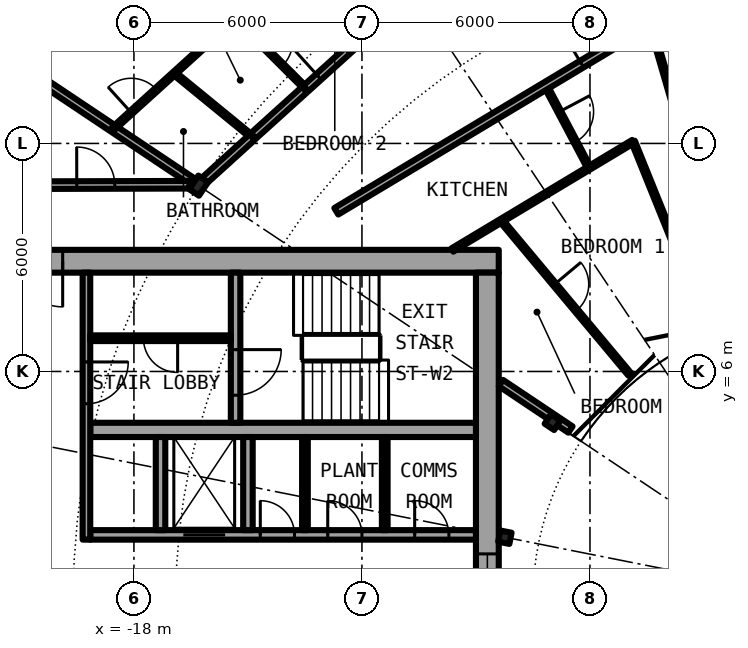
"""IFC4 building model, lengths in metres.
Left out: names, types, materials, properties, quantities, classifications, styles, units other than length and angle.
Written with IfcOpenShell. Run it as: python <this file> out.ifc"""

import sys

from ifc_helpers import new_model, si_unit, direction, frame, frame_2d, origin, origin_2d, place, context, subcontext, project, spatial, rectangle, i_section, extrude, element, fill, save


model = new_model("IFC4")
c1 = context("Model", 3, precision=1e-05, world=origin(), true_north=direction((0.0, 1.0)))
c2 = subcontext(c1, "Body", "Model", "MODEL_VIEW")
j1 = project(units=[si_unit("LENGTHUNIT", "METRE"), si_unit("PLANEANGLEUNIT", "RADIAN")], contexts=[c1])
p1 = place(None, origin())
s1 = spatial("IfcSite", under=j1, at=p1, CompositionType="ELEMENT")
p2 = place(p1, origin())
s2 = spatial("IfcBuilding", under=s1, at=p2, CompositionType="ELEMENT")
p3 = place(p2, frame((0.0, 0.0, 129.95)))
s3 = spatial("IfcBuildingStorey", under=s2, at=p3, CompositionType="ELEMENT", Elevation=129.95)
p4 = place(p3, frame((-16.297, 10.889, 0.0), z_axis=(0.0, 0.0, 1.0), x_axis=(-0.831469612303, 0.55557023302, 0.0)))
e1 = element("IfcColumn", 1, at=p4, inside=s3, PredefinedType="COLUMN", context=c2, shape_type="SweptSolid", body=[
    extrude(i_section(OverallWidth=0.307, OverallDepth=0.432, WebThickness=0.021, FlangeThickness=0.04, FilletRadius=0.027, at=origin_2d()), origin(), (0.0, 0.0, 1.0), 3.05),
])
for number, where, z_axis, x_axis in (
    (2, (-6.984, 4.667, 0.0), (0.0, 0.0, 1.0), (-0.831, 0.556, 0.0)),
    (3, (-8.239, 1.639, 0.0), (0.0, 0.0, 1.0), (-0.981, 0.195, 0.0)),
):
    element("IfcColumn", number, at=place(p3, frame(where, z_axis=z_axis, x_axis=x_axis)), inside=s3, PredefinedType="COLUMN", context=c2, shape_type="SweptSolid", body=[
        extrude(i_section(OverallWidth=0.3, OverallDepth=0.3, WebThickness=0.011, FlangeThickness=0.019, FilletRadius=0.027, at=origin_2d()), origin(), (0.0, 0.0, 1.0), 3.05),
    ])
p5 = place(p3, frame((-8.4, 8.9, 0.0), z_axis=(0.0, 0.0, 1.0), x_axis=(-1.0, 0.0, 0.0)))
e4 = element("IfcWall", 4, at=p5, inside=s3, PredefinedType="SHEAR", context=c2, shape_type="SweptSolid", body=[
    extrude(rectangle(XDim=13.8, YDim=0.6, at=frame_2d((6.9, 0.0))), origin(), (0.0, 0.0, 1.0), 3.05),
])
p6 = place(p5, frame((11.475, 0.0, 0.0)))
e5 = element("IfcOpeningElement", 5, at=p6, cuts=e4, PredefinedType="OPENING", context=c2, shape_type="SweptSolid", body=[
    extrude(rectangle(XDim=1.2, YDim=2.3, at=frame_2d((0.6, 1.15))), frame((0.0, 0.31, 0.0), z_axis=(0.0, -1.0, 0.0), x_axis=(1.0, 0.0, 0.0)), (0.0, 0.0, 1.0), 0.62),
])
p7 = place(p3, frame((-8.7, 8.6, 0.0), z_axis=(0.0, 0.0, 1.0), x_axis=(0.0, -1.0, 0.0)))
e6 = element("IfcWall", 6, at=p7, inside=s3, PredefinedType="SHEAR", context=c2, shape_type="SweptSolid", body=[
    extrude(rectangle(XDim=17.2, YDim=0.6, at=frame_2d((8.6, 0.0))), origin(), (0.0, 0.0, 1.0), 3.05),
])
p8 = place(p7, frame((7.4, 0.0, 0.1)))
e7 = element("IfcOpeningElement", 7, at=p8, cuts=e6, PredefinedType="OPENING", context=c2, shape_type="SweptSolid", body=[
    extrude(rectangle(XDim=2.4, YDim=2.2, at=frame_2d((1.2, 1.1))), frame((0.0, 0.31, 0.0), z_axis=(0.0, -1.0, 0.0), x_axis=(1.0, 0.0, 0.0)), (0.0, 0.0, 1.0), 0.62),
])
p9 = place(p3, frame((-19.15, 1.7, 0.0), z_axis=(0.0, 0.0, 1.0), x_axis=(1.0, 0.0, 0.0)))
e8 = element("IfcWall", 8, at=p9, inside=s3, PredefinedType="SHEAR", context=c2, shape_type="SweptSolid", body=[
    extrude(rectangle(XDim=10.15, YDim=0.25, at=frame_2d((5.075, 0.0))), origin(), (0.0, 0.0, 1.0), 3.05),
])
p10 = place(p9, frame((2.45, 0.0, 0.0)))
e9 = element("IfcOpeningElement", 9, at=p10, cuts=e8, PredefinedType="OPENING", context=c2, shape_type="SweptSolid", body=[
    extrude(rectangle(XDim=1.1, YDim=2.3, at=frame_2d((0.55, 1.15))), frame((0.0, 0.135, 0.0), z_axis=(0.0, -1.0, 0.0), x_axis=(1.0, 0.0, 0.0)), (0.0, 0.0, 1.0), 0.27),
])
p11 = place(p9, frame((8.538, 0.0, 0.0)))
e10 = element("IfcOpeningElement", 10, at=p11, cuts=e8, PredefinedType="OPENING", context=c2, shape_type="SweptSolid", body=[
    extrude(rectangle(XDim=0.9, YDim=2.3, at=frame_2d((0.45, 1.15))), frame((0.0, 0.135, 0.0), z_axis=(0.0, -1.0, 0.0), x_axis=(1.0, 0.0, 0.0)), (0.0, 0.0, 1.0), 0.27),
])
p12 = place(p9, frame((6.25, 0.0, 0.0)))
e11 = element("IfcOpeningElement", 11, at=p12, cuts=e8, PredefinedType="OPENING", context=c2, shape_type="SweptSolid", body=[
    extrude(rectangle(XDim=0.9, YDim=2.3, at=frame_2d((0.45, 1.15))), frame((0.0, 0.135, 0.0), z_axis=(0.0, -1.0, 0.0), x_axis=(1.0, 0.0, 0.0)), (0.0, 0.0, 1.0), 0.27),
])
p13 = place(p9, frame((4.475, 0.0, 0.0)))
e12 = element("IfcOpeningElement", 12, at=p13, cuts=e8, PredefinedType="OPENING", context=c2, shape_type="SweptSolid", body=[
    extrude(rectangle(XDim=0.9, YDim=2.3, at=frame_2d((0.45, 1.15))), frame((0.0, 0.135, 0.0), z_axis=(0.0, -1.0, 0.0), x_axis=(1.0, 0.0, 0.0)), (0.0, 0.0, 1.0), 0.27),
])
p14 = place(p3, frame((-9.0, 4.462, 0.0), z_axis=(0.0, 0.0, 1.0), x_axis=(-1.0, 0.0, 0.0)))
e13 = element("IfcWall", 13, at=p14, inside=s3, PredefinedType="SHEAR", context=c2, shape_type="SweptSolid", body=[
    extrude(rectangle(XDim=10.15, YDim=0.375, at=frame_2d((5.075, 0.0))), origin(), (0.0, 0.0, 1.0), 3.05),
])
p15 = place(p3, frame((-15.325, 8.6, 0.0), z_axis=(0.0, 0.0, 1.0), x_axis=(0.0, -1.0, 0.0)))
e14 = element("IfcWall", 14, at=p15, inside=s3, PredefinedType="SHEAR", context=c2, shape_type="SweptSolid", body=[
    extrude(rectangle(XDim=3.95, YDim=0.25, at=frame_2d((1.975, 0.0))), origin(), (0.0, 0.0, 1.0), 3.05),
])
p16 = place(p15, frame((2.025, 0.0, 0.0)))
e15 = element("IfcOpeningElement", 15, at=p16, cuts=e14, PredefinedType="OPENING", context=c2, shape_type="SweptSolid", body=[
    extrude(rectangle(XDim=1.2, YDim=2.3, at=frame_2d((0.6, 1.15))), frame((0.0, 0.135, 0.0), z_axis=(0.0, -1.0, 0.0), x_axis=(1.0, 0.0, 0.0)), (0.0, 0.0, 1.0), 0.27),
])
for number, where, z_axis, x_axis in (
    (16, (-15.0, 1.825, 0.0), (0.0, 0.0, 1.0), (0.0, 1.0, 0.0)),
    (17, (-17.3, 1.825, 0.0), (0.0, 0.0, 1.0), (0.0, 1.0, 0.0)),
):
    element("IfcWall", number, at=place(p3, frame(where, z_axis=z_axis, x_axis=x_axis)), inside=s3, PredefinedType="SOLIDWALL", context=c2, shape_type="SweptSolid", body=[
        extrude(rectangle(XDim=2.45, YDim=0.25, at=frame_2d((1.225, 0.0))), origin(), (0.0, 0.0, 1.0), 2.7),
    ])
p17 = place(p3, frame((-19.25, 8.6, 0.0), z_axis=(0.0, 0.0, 1.0), x_axis=(0.0, -1.0, 0.0)))
e18 = element("IfcWall", 18, at=p17, inside=s3, PredefinedType="SOLIDWALL", context=c2, shape_type="SweptSolid", body=[
    extrude(rectangle(XDim=7.025, YDim=0.2, at=frame_2d((3.513, 0.0))), origin(), (0.0, 0.0, 1.0), 2.7),
])
p18 = place(p17, frame((2.35, 0.0, 0.0)))
e19 = element("IfcOpeningElement", 19, at=p18, cuts=e18, PredefinedType="OPENING", context=c2, shape_type="SweptSolid", body=[
    extrude(rectangle(XDim=1.1, YDim=2.3, at=frame_2d((0.55, 1.15))), frame((0.0, 0.11, 0.0), z_axis=(0.0, -1.0, 0.0), x_axis=(1.0, 0.0, 0.0)), (0.0, 0.0, 1.0), 0.22),
])
for number, where, z_axis, x_axis in (
    (20, (-11.4, 1.825, 0.0), (0.0, 0.0, 1.0), (0.0, 1.0, 0.0)),
    (21, (-13.5, 1.825, 0.0), (0.0, 0.0, 1.0), (0.0, 1.0, 0.0)),
):
    element("IfcWall", number, at=place(p3, frame(where, z_axis=z_axis, x_axis=x_axis)), inside=s3, PredefinedType="PARTITIONING", context=c2, shape_type="SweptSolid", body=[
        extrude(rectangle(XDim=2.45, YDim=0.15, at=frame_2d((1.225, 0.0))), origin(), (0.0, 0.0, 1.0), 2.7),
    ])
p19 = place(p3, frame((-15.45, 6.875, 0.0), z_axis=(0.0, 0.0, 1.0), x_axis=(-1.0, 0.0, 0.0)))
e22 = element("IfcWall", 22, at=p19, inside=s3, PredefinedType="PARTITIONING", context=c2, shape_type="SweptSolid", body=[
    extrude(rectangle(XDim=3.7, YDim=0.15, at=frame_2d((1.85, 0.0))), origin(), (0.0, 0.0, 1.0), 2.7),
])
p20 = place(p19, frame((1.4, 0.0, 0.0)))
e23 = element("IfcOpeningElement", 23, at=p20, cuts=e22, PredefinedType="OPENING", context=c2, shape_type="SweptSolid", body=[
    extrude(rectangle(XDim=0.9, YDim=2.3, at=frame_2d((0.45, 1.15))), frame((0.0, 0.085, 0.0), z_axis=(0.0, -1.0, 0.0), x_axis=(1.0, 0.0, 0.0)), (0.0, 0.0, 1.0), 0.17),
])
p21 = place(p3, frame((-22.595, 15.098, 0.0), z_axis=(0.0, 0.0, 1.0), x_axis=(0.831406593008, -0.555664536482, 0.0)))
e24 = element("IfcWall", 24, at=p21, inside=s3, PredefinedType="PARTITIONING", context=c2, shape_type="SweptSolid", body=[
    extrude(rectangle(XDim=7.358, YDim=0.2, at=frame_2d((3.679, 0.0))), origin(), (0.0, 0.0, 1.0), 2.7),
])
p22 = place(p3, frame((-16.936, 13.845, 0.0), z_axis=(0.0, 0.0, 1.0), x_axis=(0.774162545943, -0.632986850147, 0.0)))
e25 = element("IfcWall", 25, at=p22, inside=s3, PredefinedType="PARTITIONING", context=c2, shape_type="SweptSolid", body=[
    extrude(rectangle(XDim=2.649, YDim=0.1, at=frame_2d((1.325, 0.0))), origin(), (0.0, 0.0, 1.0), 2.7),
])
p23 = place(p3, frame((-15.333, 15.297, 0.0), z_axis=(0.0, 0.0, 1.0), x_axis=(0.707851299421, -0.706361478217, 0.0)))
e26 = element("IfcWall", 26, at=p23, inside=s3, PredefinedType="PARTITIONING", context=c2, shape_type="SweptSolid", body=[
    extrude(rectangle(XDim=2.622, YDim=0.1, at=frame_2d((1.311, 0.0))), origin(), (0.0, 0.0, 1.0), 2.7),
])
p24 = place(p23, frame((0.861, 0.0, 0.0)))
e27 = element("IfcOpeningElement", 27, at=p24, cuts=e26, PredefinedType="OPENING", context=c2, shape_type="SweptSolid", body=[
    extrude(rectangle(XDim=0.9, YDim=2.3, at=frame_2d((0.45, 1.15))), frame((0.0, 0.06, 0.0), z_axis=(0.0, -1.0, 0.0), x_axis=(1.0, 0.0, 0.0)), (0.0, 0.0, 1.0), 0.12),
])
p25 = place(p3, frame((-8.335, 9.97, 0.0), z_axis=(0.0, 0.0, 1.0), x_axis=(0.641376424834, -0.767226356213, 0.0)))
e28 = element("IfcWall", 28, at=p25, inside=s3, PredefinedType="PARTITIONING", context=c2, shape_type="SweptSolid", body=[
    extrude(rectangle(XDim=5.275, YDim=0.1, at=frame_2d((2.637, 0.0))), origin(), (0.0, 0.0, 1.0), 2.7),
])
p26 = place(p25, frame((2.187, 0.0, 0.0)))
e29 = element("IfcOpeningElement", 29, at=p26, cuts=e28, PredefinedType="OPENING", context=c2, shape_type="SweptSolid", body=[
    extrude(rectangle(XDim=0.9, YDim=2.3, at=frame_2d((0.45, 1.15))), frame((0.0, 0.06, 0.0), z_axis=(0.0, -1.0, 0.0), x_axis=(1.0, 0.0, 0.0)), (0.0, 0.0, 1.0), 0.12),
])
p27 = place(p3, frame((-7.166, 13.517, 0.0), z_axis=(0.0, 0.0, 1.0), x_axis=(0.468337293896, -0.883549760425, 0.0)))
e30 = element("IfcWall", 30, at=p27, inside=s3, PredefinedType="PARTITIONING", context=c2, shape_type="SweptSolid", body=[
    extrude(rectangle(XDim=2.445, YDim=0.1, at=frame_2d((1.222, 0.0))), origin(), (0.0, 0.0, 1.0), 2.7),
])
p28 = place(p27, frame((0.772, 0.0, 0.0)))
e31 = element("IfcOpeningElement", 31, at=p28, cuts=e30, PredefinedType="OPENING", context=c2, shape_type="SweptSolid", body=[
    extrude(rectangle(XDim=0.9, YDim=2.3, at=frame_2d((0.45, 1.15))), frame((0.0, 0.06, 0.0), z_axis=(0.0, -1.0, 0.0), x_axis=(1.0, 0.0, 0.0)), (0.0, 0.0, 1.0), 0.12),
])
p29 = place(p3, frame((-4.864, 12.051, 0.0), z_axis=(0.0, 0.0, 1.0), x_axis=(0.374372761824, -0.927278294367, 0.0)))
e32 = element("IfcWall", 32, at=p29, inside=s3, PredefinedType="PARTITIONING", context=c2, shape_type="SweptSolid", body=[
    extrude(rectangle(XDim=5.276, YDim=0.1, at=frame_2d((2.638, 0.0))), origin(), (0.0, 0.0, 1.0), 2.7),
])
p30 = place(p29, frame((2.188, 0.0, 0.0)))
e33 = element("IfcOpeningElement", 33, at=p30, cuts=e32, PredefinedType="OPENING", context=c2, shape_type="SweptSolid", body=[
    extrude(rectangle(XDim=0.9, YDim=2.3, at=frame_2d((0.45, 1.15))), frame((0.0, 0.06, 0.0), z_axis=(0.0, -1.0, 0.0), x_axis=(1.0, 0.0, 0.0)), (0.0, 0.0, 1.0), 0.12),
])
p31 = place(p3, frame((-4.411, 15.168, 0.0), z_axis=(0.0, 0.0, 1.0), x_axis=(0.279201466266, -0.960232545395, 0.0)))
e34 = element("IfcWall", 34, at=p31, inside=s3, PredefinedType="PARTITIONING", context=c2, shape_type="SweptSolid", body=[
    extrude(rectangle(XDim=2.524, YDim=0.1, at=frame_2d((1.262, 0.0))), origin(), (0.0, 0.0, 1.0), 2.7),
])
p32 = place(p3, frame((-6.513, 4.472, 0.0), z_axis=(0.0, 0.0, 1.0), x_axis=(-0.831333375071, 0.555774072347, 0.0)))
e35 = element("IfcWall", 35, at=p32, inside=s3, PredefinedType="PARTITIONING", context=c2, shape_type="SweptSolid", body=[
    extrude(rectangle(XDim=2.203, YDim=0.2, at=frame_2d((1.101, 0.0))), origin(), (0.0, 0.0, 1.0), 2.7),
])
p33 = place(p3, frame((-21.675, 10.9, 0.0), z_axis=(0.0, 0.0, 1.0), x_axis=(0.99999670426, 0.002567385634, 0.0)))
e36 = element("IfcWall", 36, at=p33, inside=s3, PredefinedType="PARTITIONING", context=c2, shape_type="SweptSolid", body=[
    extrude(rectangle(XDim=5.135, YDim=0.2, at=frame_2d((2.567, 0.0))), origin(), (0.0, 0.0, 1.0), 2.7),
])
p34 = place(p33, frame((2.171, 0.0, 0.0)))
e37 = element("IfcOpeningElement", 37, at=p34, cuts=e36, PredefinedType="OPENING", context=c2, shape_type="SweptSolid", body=[
    extrude(rectangle(XDim=1.0, YDim=2.3, at=frame_2d((0.5, 1.15))), frame((0.0, 0.11, 0.0), z_axis=(0.0, -1.0, 0.0), x_axis=(1.0, 0.0, 0.0)), (0.0, 0.0, 1.0), 0.22),
])
p35 = place(p3, frame((-9.623, 9.195, 0.0), z_axis=(0.0, 0.0, 1.0), x_axis=(0.857574416464, 0.514359913122, 0.0)))
e38 = element("IfcWall", 38, at=p35, inside=s3, PredefinedType="PARTITIONING", context=c2, shape_type="SweptSolid", body=[
    extrude(rectangle(XDim=5.551, YDim=0.1, at=frame_2d((2.775, 0.0))), origin(), (0.0, 0.0, 1.0), 2.7),
])
p36 = place(p3, frame((-12.675, 10.215, 0.0), z_axis=(0.0, 0.0, 1.0), x_axis=(0.85772761283, 0.514104407867, 0.0)))
e39 = element("IfcWall", 39, at=p36, inside=s3, PredefinedType="PARTITIONING", context=c2, shape_type="SweptSolid", body=[
    extrude(rectangle(XDim=12.846, YDim=0.2, at=frame_2d((6.423, 0.0))), origin(), (0.0, 0.0, 1.0), 2.7),
])
p37 = place(p36, frame((7.529, 0.0, 0.0)))
e40 = element("IfcOpeningElement", 40, at=p37, cuts=e39, PredefinedType="OPENING", context=c2, shape_type="SweptSolid", body=[
    extrude(rectangle(XDim=1.0, YDim=2.3, at=frame_2d((0.5, 1.15))), frame((0.0, 0.11, 0.0), z_axis=(0.0, -1.0, 0.0), x_axis=(1.0, 0.0, 0.0)), (0.0, 0.0, 1.0), 0.22),
])
p38 = place(p3, frame((-16.179, 10.995, 0.0), z_axis=(0.0, 0.0, 1.0), x_axis=(0.74092608219, 0.671586584687, 0.0)))
e41 = element("IfcWall", 41, at=p38, inside=s3, PredefinedType="PARTITIONING", context=c2, shape_type="SweptSolid", body=[
    extrude(rectangle(XDim=1.746, YDim=0.2, at=frame_2d((0.873, 0.0))), origin(), (0.0, 0.0, 1.0), 2.39),
])
p39 = place(p3, frame((-14.855, 12.201, 0.0), z_axis=(0.0, 0.0, 1.0), x_axis=(0.742026993487, 0.670370003011, 0.0)))
e42 = element("IfcWall", 42, at=p39, inside=s3, PredefinedType="PARTITIONING", context=c2, shape_type="SweptSolid", body=[
    extrude(rectangle(XDim=1.812, YDim=0.2, at=frame_2d((0.906, 0.0))), origin(), (0.0, 0.0, 1.0), 2.39),
])
p40 = place(p3, frame((-13.474, 13.448, 0.0), z_axis=(0.0, 0.0, 1.0), x_axis=(0.742096578776, 0.670292971595, 0.0)))
e43 = element("IfcWall", 43, at=p40, inside=s3, PredefinedType="PARTITIONING", context=c2, shape_type="SweptSolid", body=[
    extrude(rectangle(XDim=1.938, YDim=0.2, at=frame_2d((0.969, 0.0))), origin(), (0.0, 0.0, 1.0), 2.7),
])
p41 = place(p40, frame((0.453, 0.0, 0.0)))
e44 = element("IfcOpeningElement", 44, at=p41, cuts=e43, PredefinedType="OPENING", context=c2, shape_type="SweptSolid", body=[
    extrude(rectangle(XDim=1.0, YDim=2.3, at=frame_2d((0.5, 1.15))), frame((0.0, 0.11, 0.0), z_axis=(0.0, -1.0, 0.0), x_axis=(1.0, 0.0, 0.0)), (0.0, 0.0, 1.0), 0.22),
])
p42 = place(p3, frame((-18.54, 12.392, 0.0), z_axis=(0.0, 0.0, 1.0), x_axis=(0.741109646243, 0.671384012504, 0.0)))
e45 = element("IfcWall", 45, at=p42, inside=s3, PredefinedType="PARTITIONING", context=c2, shape_type="SweptSolid", body=[
    extrude(rectangle(XDim=4.331, YDim=0.1, at=frame_2d((2.166, 0.0))), origin(), (0.0, 0.0, 1.0), 2.7),
])
p43 = place(p42, frame((0.629, 0.0, 0.0)))
e46 = element("IfcOpeningElement", 46, at=p43, cuts=e45, PredefinedType="OPENING", context=c2, shape_type="SweptSolid", body=[
    extrude(rectangle(XDim=0.9, YDim=2.3, at=frame_2d((0.45, 1.15))), frame((0.0, 0.06, 0.0), z_axis=(0.0, -1.0, 0.0), x_axis=(1.0, 0.0, 0.0)), (0.0, 0.0, 1.0), 0.12),
])
p44 = place(p10, origin())
e47 = element("IfcDoor", 47, at=p44, inside=s3, OperationType="DOUBLE_DOOR_SLIDING", PredefinedType="DOOR", context=c2, shape_type="SweptSolid", body=[
    extrude(rectangle(XDim=1.1, YDim=2.3, at=frame_2d((0.55, 1.15))), frame((0.0, 0.025, 0.0), z_axis=(0.0, -1.0, 0.0), x_axis=(1.0, 0.0, 0.0)), (0.0, 0.0, 1.0), 0.05),
])
fill(e9, e47)
p45 = place(p11, origin())
e48 = element("IfcDoor", 48, at=p45, inside=s3, OperationType="SINGLE_SWING_LEFT", PredefinedType="DOOR", context=c2, shape_type="SweptSolid", body=[
    extrude(rectangle(XDim=0.9, YDim=2.3, at=frame_2d((0.45, 1.15))), frame((0.0, 0.025, 0.0), z_axis=(0.0, -1.0, 0.0), x_axis=(1.0, 0.0, 0.0)), (0.0, 0.0, 1.0), 0.05),
])
fill(e10, e48)
p46 = place(p12, origin())
e49 = element("IfcDoor", 49, at=p46, inside=s3, OperationType="SINGLE_SWING_LEFT", PredefinedType="DOOR", context=c2, shape_type="SweptSolid", body=[
    extrude(rectangle(XDim=0.9, YDim=2.3, at=frame_2d((0.45, 1.15))), frame((0.0, 0.025, 0.0), z_axis=(0.0, -1.0, 0.0), x_axis=(1.0, 0.0, 0.0)), (0.0, 0.0, 1.0), 0.05),
])
fill(e11, e49)
p47 = place(p13, origin())
e50 = element("IfcDoor", 50, at=p47, inside=s3, OperationType="SINGLE_SWING_RIGHT", PredefinedType="DOOR", context=c2, shape_type="SweptSolid", body=[
    extrude(rectangle(XDim=0.9, YDim=2.3, at=frame_2d((0.45, 1.15))), frame((0.0, 0.025, 0.0), z_axis=(0.0, -1.0, 0.0), x_axis=(1.0, 0.0, 0.0)), (0.0, 0.0, 1.0), 0.05),
])
fill(e12, e50)
p48 = place(p20, origin())
e51 = element("IfcDoor", 51, at=p48, inside=s3, OperationType="SINGLE_SWING_LEFT", PredefinedType="DOOR", context=c2, shape_type="SweptSolid", body=[
    extrude(rectangle(XDim=0.9, YDim=2.3, at=frame_2d((0.45, 1.15))), frame((0.0, 0.025, 0.0), z_axis=(0.0, -1.0, 0.0), x_axis=(1.0, 0.0, 0.0)), (0.0, 0.0, 1.0), 0.05),
])
fill(e23, e51)
p49 = place(p16, origin())
e52 = element("IfcDoor", 52, at=p49, inside=s3, OperationType="SINGLE_SWING_LEFT", PredefinedType="DOOR", context=c2, shape_type="SweptSolid", body=[
    extrude(rectangle(XDim=1.2, YDim=2.3, at=frame_2d((0.6, 1.15))), frame((0.0, 0.025, 0.0), z_axis=(0.0, -1.0, 0.0), x_axis=(1.0, 0.0, 0.0)), (0.0, 0.0, 1.0), 0.05),
])
fill(e15, e52)
p50 = place(p18, origin())
e53 = element("IfcDoor", 53, at=p50, inside=s3, OperationType="SINGLE_SWING_RIGHT", PredefinedType="DOOR", context=c2, shape_type="SweptSolid", body=[
    extrude(rectangle(XDim=1.1, YDim=2.3, at=frame_2d((0.55, 1.15))), frame((0.0, 0.025, 0.0), z_axis=(0.0, -1.0, 0.0), x_axis=(1.0, 0.0, 0.0)), (0.0, 0.0, 1.0), 0.05),
])
fill(e19, e53)
p51 = place(p6, origin())
e54 = element("IfcDoor", 54, at=p51, inside=s3, OperationType="SINGLE_SWING_LEFT", PredefinedType="DOOR", context=c2, shape_type="SweptSolid", body=[
    extrude(rectangle(XDim=1.2, YDim=2.3, at=frame_2d((0.6, 1.15))), frame((0.0, 0.025, 0.0), z_axis=(0.0, -1.0, 0.0), x_axis=(1.0, 0.0, 0.0)), (0.0, 0.0, 1.0), 0.05),
])
fill(e5, e54)
p52 = place(p8, origin())
e55 = element("IfcWindow", 55, at=p52, inside=s3, PartitioningType="SINGLE_PANEL", PredefinedType="WINDOW", context=c2, shape_type="SweptSolid", body=[
    extrude(rectangle(XDim=2.4, YDim=2.2, at=frame_2d((1.2, 1.1))), frame((0.0, 0.03, 0.0), z_axis=(0.0, -1.0, 0.0), x_axis=(1.0, 0.0, 0.0)), (0.0, 0.0, 1.0), 0.06),
])
fill(e7, e55)
p53 = place(p41, origin())
e56 = element("IfcDoor", 56, at=p53, inside=s3, OperationType="SINGLE_SWING_LEFT", PredefinedType="DOOR", context=c2, shape_type="SweptSolid", body=[
    extrude(rectangle(XDim=1.0, YDim=2.3, at=frame_2d((0.5, 1.15))), frame((0.0, 0.025, 0.0), z_axis=(0.0, -1.0, 0.0), x_axis=(1.0, 0.0, 0.0)), (0.0, 0.0, 1.0), 0.05),
])
fill(e44, e56)
p54 = place(p43, origin())
e57 = element("IfcDoor", 57, at=p54, inside=s3, OperationType="SINGLE_SWING_LEFT", PredefinedType="DOOR", context=c2, shape_type="SweptSolid", body=[
    extrude(rectangle(XDim=0.9, YDim=2.3, at=frame_2d((0.45, 1.15))), frame((0.0, 0.025, 0.0), z_axis=(0.0, -1.0, 0.0), x_axis=(1.0, 0.0, 0.0)), (0.0, 0.0, 1.0), 0.05),
])
fill(e46, e57)
p55 = place(p24, origin())
e58 = element("IfcDoor", 58, at=p55, inside=s3, OperationType="SINGLE_SWING_RIGHT", PredefinedType="DOOR", context=c2, shape_type="SweptSolid", body=[
    extrude(rectangle(XDim=0.9, YDim=2.3, at=frame_2d((0.45, 1.15))), frame((0.0, 0.025, 0.0), z_axis=(0.0, -1.0, 0.0), x_axis=(1.0, 0.0, 0.0)), (0.0, 0.0, 1.0), 0.05),
])
fill(e27, e58)
p56 = place(p37, origin())
e59 = element("IfcDoor", 59, at=p56, inside=s3, OperationType="SINGLE_SWING_RIGHT", PredefinedType="DOOR", context=c2, shape_type="SweptSolid", body=[
    extrude(rectangle(XDim=1.0, YDim=2.3, at=frame_2d((0.5, 1.15))), frame((0.0, 0.025, 0.0), z_axis=(0.0, -1.0, 0.0), x_axis=(1.0, 0.0, 0.0)), (0.0, 0.0, 1.0), 0.05),
])
fill(e40, e59)
p57 = place(p28, origin())
e60 = element("IfcDoor", 60, at=p57, inside=s3, OperationType="SINGLE_SWING_LEFT", PredefinedType="DOOR", context=c2, shape_type="SweptSolid", body=[
    extrude(rectangle(XDim=0.9, YDim=2.3, at=frame_2d((0.45, 1.15))), frame((0.0, 0.025, 0.0), z_axis=(0.0, -1.0, 0.0), x_axis=(1.0, 0.0, 0.0)), (0.0, 0.0, 1.0), 0.05),
])
fill(e31, e60)
p58 = place(p30, origin())
e61 = element("IfcDoor", 61, at=p58, inside=s3, OperationType="SINGLE_SWING_RIGHT", PredefinedType="DOOR", context=c2, shape_type="SweptSolid", body=[
    extrude(rectangle(XDim=0.9, YDim=2.3, at=frame_2d((0.45, 1.15))), frame((0.0, 0.025, 0.0), z_axis=(0.0, -1.0, 0.0), x_axis=(1.0, 0.0, 0.0)), (0.0, 0.0, 1.0), 0.05),
])
fill(e33, e61)
p59 = place(p26, origin())
e62 = element("IfcDoor", 62, at=p59, inside=s3, OperationType="SINGLE_SWING_RIGHT", PredefinedType="DOOR", context=c2, shape_type="SweptSolid", body=[
    extrude(rectangle(XDim=0.9, YDim=2.3, at=frame_2d((0.45, 1.15))), frame((0.0, 0.025, 0.0), z_axis=(0.0, -1.0, 0.0), x_axis=(1.0, 0.0, 0.0)), (0.0, 0.0, 1.0), 0.05),
])
fill(e29, e62)
p60 = place(p34, origin())
e63 = element("IfcDoor", 63, at=p60, inside=s3, OperationType="SINGLE_SWING_RIGHT", PredefinedType="DOOR", context=c2, shape_type="SweptSolid", body=[
    extrude(rectangle(XDim=1.0, YDim=2.3, at=frame_2d((0.5, 1.15))), frame((0.0, 0.025, 0.0), z_axis=(0.0, -1.0, 0.0), x_axis=(1.0, 0.0, 0.0)), (0.0, 0.0, 1.0), 0.05),
])
fill(e37, e63)
save(model, sys.argv[1])
